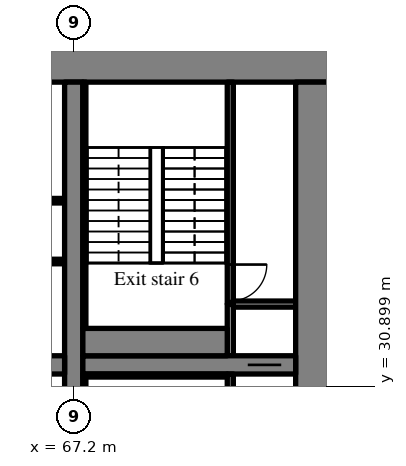
"""IFC4 building model, lengths in metres.
Left out: names, types, materials, properties, quantities, classifications, styles, units other than length and angle.
Written with IfcOpenShell. Run it as: python <this file> out.ifc"""

import sys

from ifc_helpers import new_model, si_unit, direction, frame, frame_2d, origin, place, context, subcontext, project, spatial, rectangle, extrude, source, transform, mapped, element, fill, save


model = new_model("IFC4")
c1 = context("Model", 3, precision=1e-05, world=origin(), true_north=direction((0.0, 1.0)))
c2 = subcontext(c1, "Body", "Model", "MODEL_VIEW")
j1 = project(units=[si_unit("LENGTHUNIT", "METRE"), si_unit("PLANEANGLEUNIT", "RADIAN")], contexts=[c1])
p1 = place(None, origin())
s1 = spatial("IfcSite", under=j1, at=p1, CompositionType="ELEMENT")
p2 = place(p1, origin())
s2 = spatial("IfcBuilding", under=s1, at=p2, CompositionType="ELEMENT")
p3 = place(p2, frame((0.0, 0.0, -4.5)))
s3 = spatial("IfcBuildingStorey", under=s2, at=p3, CompositionType="ELEMENT", Elevation=-4.5)
m1 = source(origin(), c2, "Body", "SweptSolid", [
    extrude(rectangle(XDim=50.4, YDim=1.1, at=frame_2d((25.2, 0.0))), origin(), (0.0, 0.0, 1.0), 4.22),
])
p4 = place(p3, frame((25.2, 41.45, 0.0), z_axis=(0.0, 0.0, 1.0), x_axis=(1.0, 0.0, 0.0)))
e1 = element("IfcWall", 1, at=p4, inside=s3, PredefinedType="SHEAR", context=c2, shape_type="MappedRepresentation", body=[
    mapped(m1, transform((0.0, 0.0, 0.0), scale=1.0)),
])
m2 = source(origin(), c2, "Body", "SweptSolid", [
    extrude(rectangle(XDim=17.8, YDim=1.1, at=frame_2d((8.9, 0.0))), origin(), (0.0, 0.0, 1.0), 4.22),
])
p5 = place(p3, frame((75.05, 23.1, 0.0), z_axis=(0.0, 0.0, 1.0), x_axis=(0.0, 1.0, 0.0)))
e2 = element("IfcWall", 2, at=p5, inside=s3, PredefinedType="SHEAR", context=c2, shape_type="MappedRepresentation", body=[
    mapped(m2, transform((0.0, 0.0, 0.0), scale=1.0)),
])
m3 = source(origin(), c2, "Body", "SweptSolid", [
    extrude(rectangle(XDim=17.8, YDim=0.6, at=frame_2d((8.9, 0.0))), origin(), (0.0, 0.0, 1.0), 4.22),
])
p6 = place(p3, frame((67.2, 23.1, 0.0), z_axis=(0.0, 0.0, 1.0), x_axis=(0.0, 1.0, 0.0)))
e3 = element("IfcWall", 3, at=p6, inside=s3, PredefinedType="SHEAR", context=c2, shape_type="MappedRepresentation", body=[
    mapped(m3, transform((0.0, 0.0, 0.0), scale=1.0)),
])
m4 = source(origin(), c2, "Body", "SweptSolid", [
    extrude(rectangle(XDim=16.2, YDim=0.6, at=frame_2d((8.1, 0.0))), origin(), (0.0, 0.0, 1.0), 4.22),
])
p7 = place(p3, frame((50.7, 31.6, 0.0), z_axis=(0.0, 0.0, 1.0), x_axis=(1.0, 0.0, 0.0)))
e4 = element("IfcWall", 4, at=p7, inside=s3, PredefinedType="SHEAR", context=c2, shape_type="MappedRepresentation", body=[
    mapped(m4, transform((0.0, 0.0, 0.0), scale=1.0)),
])
m5 = source(origin(), c2, "Body", "SweptSolid", [
    extrude(rectangle(XDim=1.0, YDim=2.1, at=frame_2d((0.5, 1.05))), frame((0.0, 0.31, 0.0), z_axis=(0.0, -1.0, 0.0), x_axis=(1.0, 0.0, 0.0)), (0.0, 0.0, 1.0), 0.62),
])
p8 = place(p7, frame((0.55, 0.0, 0.0)))
e5 = element("IfcOpeningElement", 5, at=p8, cuts=e4, PredefinedType="OPENING", context=c2, shape_type="MappedRepresentation", body=[
    mapped(m5, transform((0.0, 0.0, 0.0), scale=1.0)),
])
m6 = source(origin(), c2, "Body", "SweptSolid", [
    extrude(rectangle(XDim=7.0, YDim=0.6, at=frame_2d((3.5, 0.0))), origin(), (0.0, 0.0, 1.0), 4.22),
])
p9 = place(p3, frame((67.5, 31.6, 0.0), z_axis=(0.0, 0.0, 1.0), x_axis=(1.0, 0.0, 0.0)))
e6 = element("IfcWall", 6, at=p9, inside=s3, PredefinedType="SHEAR", context=c2, shape_type="MappedRepresentation", body=[
    mapped(m6, transform((0.0, 0.0, 0.0), scale=1.0)),
])
m7 = source(origin(), c2, "Body", "SweptSolid", [
    extrude(rectangle(XDim=1.1, YDim=2.1, at=frame_2d((0.55, 1.05))), frame((0.0, 0.31, 0.0), z_axis=(0.0, -1.0, 0.0), x_axis=(1.0, 0.0, 0.0)), (0.0, 0.0, 1.0), 0.62),
])
p10 = place(p9, frame((5.425, 0.0, 0.0)))
e7 = element("IfcOpeningElement", 7, at=p10, cuts=e6, PredefinedType="OPENING", context=c2, shape_type="MappedRepresentation", body=[
    mapped(m7, transform((0.0, 0.0, 0.0), scale=1.0)),
])
m8 = source(origin(), c2, "Body", "SweptSolid", [
    extrude(rectangle(XDim=14.1, YDim=0.15, at=frame_2d((7.05, 0.0))), origin(), (0.0, 0.0, 1.0), 4.22),
])
p11 = place(p3, frame((66.9, 35.0, 0.0), z_axis=(0.0, 0.0, 1.0), x_axis=(-1.0, 0.0, 0.0)))
e8 = element("IfcWall", 8, at=p11, inside=s3, PredefinedType="PARTITIONING", context=c2, shape_type="MappedRepresentation", body=[
    mapped(m8, transform((0.0, 0.0, 0.0), scale=1.0)),
])
m9 = source(origin(), c2, "Body", "SweptSolid", [
    extrude(rectangle(XDim=0.9, YDim=2.1, at=frame_2d((0.45, 1.05))), frame((0.0, 0.085, 0.0), z_axis=(0.0, -1.0, 0.0), x_axis=(1.0, 0.0, 0.0)), (0.0, 0.0, 1.0), 0.17),
])
p12 = place(p11, frame((0.952, 0.0, 0.0)))
e9 = element("IfcOpeningElement", 9, at=p12, cuts=e8, PredefinedType="OPENING", context=c2, shape_type="MappedRepresentation", body=[
    mapped(m9, transform((0.0, 0.0, 0.0), scale=1.0)),
])
p13 = place(p11, frame((5.861, 0.0, 0.0)))
e10 = element("IfcOpeningElement", 10, at=p13, cuts=e8, PredefinedType="OPENING", context=c2, shape_type="MappedRepresentation", body=[
    mapped(m9, transform((0.0, 0.0, 0.0), scale=1.0)),
])
p14 = place(p11, frame((11.471, 0.0, 0.0)))
e11 = element("IfcOpeningElement", 11, at=p14, cuts=e8, PredefinedType="OPENING", context=c2, shape_type="MappedRepresentation", body=[
    mapped(m9, transform((0.0, 0.0, 0.0), scale=1.0)),
])
m10 = source(origin(), c2, "Body", "SweptSolid", [
    extrude(rectangle(XDim=16.2, YDim=0.15, at=frame_2d((8.1, 0.0))), origin(), (0.0, 0.0, 1.0), 4.22),
])
p15 = place(p3, frame((66.9, 37.0, 0.0), z_axis=(0.0, 0.0, 1.0), x_axis=(-1.0, 0.0, 0.0)))
e12 = element("IfcWall", 12, at=p15, inside=s3, PredefinedType="PARTITIONING", context=c2, shape_type="MappedRepresentation", body=[
    mapped(m10, transform((0.0, 0.0, 0.0), scale=1.0)),
])
p16 = place(p15, frame((0.765, 0.0, 0.0)))
e13 = element("IfcOpeningElement", 13, at=p16, cuts=e12, PredefinedType="OPENING", context=c2, shape_type="MappedRepresentation", body=[
    mapped(m9, transform((0.0, 0.0, 0.0), scale=1.0)),
])
p17 = place(p15, frame((3.6, 0.0, 0.0)))
e14 = element("IfcOpeningElement", 14, at=p17, cuts=e12, PredefinedType="OPENING", context=c2, shape_type="MappedRepresentation", body=[
    mapped(m9, transform((0.0, 0.0, 0.0), scale=1.0)),
])
p18 = place(p15, frame((9.27, 0.0, 0.0)))
e15 = element("IfcOpeningElement", 15, at=p18, cuts=e12, PredefinedType="OPENING", context=c2, shape_type="MappedRepresentation", body=[
    mapped(m9, transform((0.0, 0.0, 0.0), scale=1.0)),
])
p19 = place(p15, frame((14.535, 0.0, 0.0)))
e16 = element("IfcOpeningElement", 16, at=p19, cuts=e12, PredefinedType="OPENING", context=c2, shape_type="MappedRepresentation", body=[
    mapped(m9, transform((0.0, 0.0, 0.0), scale=1.0)),
])
m11 = source(origin(), c2, "Body", "SweptSolid", [
    extrude(rectangle(XDim=8.2, YDim=0.2, at=frame_2d((4.1, 0.0))), origin(), (0.0, 0.0, 1.0), 4.22),
])
p20 = place(p3, frame((72.35, 23.1, 0.0), z_axis=(0.0, 0.0, 1.0), x_axis=(0.0, 1.0, 0.0)))
e17 = element("IfcWall", 17, at=p20, inside=s3, PredefinedType="SOLIDWALL", context=c2, shape_type="MappedRepresentation", body=[
    mapped(m11, transform((0.0, 0.0, 0.0), scale=1.0)),
])
m12 = source(origin(), c2, "Body", "SweptSolid", [
    extrude(rectangle(XDim=1.2, YDim=2.1, at=frame_2d((0.6, 1.05))), frame((0.0, 0.11, 0.0), z_axis=(0.0, -1.0, 0.0), x_axis=(1.0, 0.0, 0.0)), (0.0, 0.0, 1.0), 0.22),
])
p21 = place(p20, frame((0.5, 0.0, 0.0)))
e18 = element("IfcOpeningElement", 18, at=p21, cuts=e17, PredefinedType="OPENING", context=c2, shape_type="MappedRepresentation", body=[
    mapped(m12, transform((0.0, 0.0, 0.0), scale=1.0)),
])
m13 = source(origin(), c2, "Body", "SweptSolid", [
    extrude(rectangle(XDim=1.7, YDim=0.2, at=frame_2d((0.85, 0.0))), origin(), (0.0, 0.0, 1.0), 4.22),
])
p22 = place(p3, frame((72.35, 31.9, 0.0), z_axis=(0.0, 0.0, 1.0), x_axis=(0.0, 1.0, 0.0)))
e19 = element("IfcWall", 19, at=p22, inside=s3, PredefinedType="SOLIDWALL", context=c2, shape_type="MappedRepresentation", body=[
    mapped(m13, transform((0.0, 0.0, 0.0), scale=1.0)),
])
m14 = source(origin(), c2, "Body", "SweptSolid", [
    extrude(rectangle(XDim=2.05, YDim=0.2, at=frame_2d((1.025, 0.0))), origin(), (0.0, 0.0, 1.0), 4.22),
])
p23 = place(p3, frame((72.45, 33.6, 0.0), z_axis=(0.0, 0.0, 1.0), x_axis=(1.0, 0.0, 0.0)))
e20 = element("IfcWall", 20, at=p23, inside=s3, PredefinedType="SOLIDWALL", context=c2, shape_type="MappedRepresentation", body=[
    mapped(m14, transform((0.0, 0.0, 0.0), scale=1.0)),
])
m15 = source(origin(), c2, "Body", "SweptSolid", [
    extrude(rectangle(XDim=7.3, YDim=0.2, at=frame_2d((3.65, 0.0))), origin(), (0.0, 0.0, 1.0), 4.22),
])
p24 = place(p3, frame((72.35, 33.6, 0.0), z_axis=(0.0, 0.0, 1.0), x_axis=(0.0, 1.0, 0.0)))
e21 = element("IfcWall", 21, at=p24, inside=s3, PredefinedType="SOLIDWALL", context=c2, shape_type="MappedRepresentation", body=[
    mapped(m15, transform((0.0, 0.0, 0.0), scale=1.0)),
])
p25 = place(p24, frame((0.1, 0.0, 0.0)))
e22 = element("IfcOpeningElement", 22, at=p25, cuts=e21, PredefinedType="OPENING", context=c2, shape_type="MappedRepresentation", body=[
    mapped(m12, transform((0.0, 0.0, 0.0), scale=1.0)),
])
m16 = source(origin(), c2, "Body", "SweptSolid", [
    extrude(rectangle(XDim=4.75, YDim=0.1, at=frame_2d((2.375, 0.0))), origin(), (0.0, 0.0, 1.0), 4.22),
])
p26 = place(p3, frame((67.5, 31.25, 0.0), z_axis=(0.0, 0.0, 1.0), x_axis=(1.0, 0.0, 0.0)))
e23 = element("IfcWall", 23, at=p26, inside=s3, PredefinedType="SOLIDWALL", context=c2, shape_type="MappedRepresentation", body=[
    mapped(m16, transform((0.0, 0.0, 0.0), scale=1.0)),
])
m17 = source(origin(), c2, "Body", "SweptSolid", [
    extrude(rectangle(XDim=8.1, YDim=0.1, at=frame_2d((4.05, 0.0))), origin(), (0.0, 0.0, 1.0), 4.22),
])
p27 = place(p3, frame((67.55, 23.1, 0.0), z_axis=(0.0, 0.0, 1.0), x_axis=(0.0, 1.0, 0.0)))
e24 = element("IfcWall", 24, at=p27, inside=s3, PredefinedType="SOLIDWALL", context=c2, shape_type="MappedRepresentation", body=[
    mapped(m17, transform((0.0, 0.0, 0.0), scale=1.0)),
])
m18 = source(origin(), c2, "Body", "SweptSolid", [
    extrude(rectangle(XDim=4.75, YDim=0.9, at=frame_2d((2.375, 0.0))), origin(), (0.0, 0.0, 1.0), 4.22),
])
p28 = place(p3, frame((67.5, 32.35, 0.0), z_axis=(0.0, 0.0, 1.0), x_axis=(1.0, 0.0, 0.0)))
e25 = element("IfcWall", 25, at=p28, inside=s3, PredefinedType="SOLIDWALL", context=c2, shape_type="MappedRepresentation", body=[
    mapped(m18, transform((0.0, 0.0, 0.0), scale=1.0)),
])
p29 = place(p3, frame((67.55, 32.8, 0.0), z_axis=(0.0, 0.0, 1.0), x_axis=(0.0, 1.0, 0.0)))
e26 = element("IfcWall", 26, at=p29, inside=s3, PredefinedType="SOLIDWALL", context=c2, shape_type="MappedRepresentation", body=[
    mapped(m17, transform((0.0, 0.0, 0.0), scale=1.0)),
])
m19 = source(origin(), c2, "Body", "SweptSolid", [
    extrude(rectangle(XDim=1.1, YDim=2.1, at=frame_2d((0.55, 1.05))), frame((0.0, 0.025, 0.0), z_axis=(0.0, -1.0, 0.0), x_axis=(1.0, 0.0, 0.0)), (0.0, 0.0, 1.0), 0.05),
])
p30 = place(p10, origin())
e27 = element("IfcDoor", 27, at=p30, inside=s3, OperationType="SLIDING_TO_RIGHT", PredefinedType="DOOR", context=c2, shape_type="MappedRepresentation", body=[
    mapped(m19, transform((0.0, 0.0, 0.0), scale=1.0)),
])
fill(e7, e27)
m20 = source(origin(), c2, "Body", "SweptSolid", [
    extrude(rectangle(XDim=1.2, YDim=2.1, at=frame_2d((0.6, 1.05))), frame((0.0, 0.025, 0.0), z_axis=(0.0, -1.0, 0.0), x_axis=(1.0, 0.0, 0.0)), (0.0, 0.0, 1.0), 0.05),
])
p31 = place(p25, origin())
e28 = element("IfcDoor", 28, at=p31, inside=s3, OperationType="SINGLE_SWING_RIGHT", PredefinedType="DOOR", context=c2, shape_type="MappedRepresentation", body=[
    mapped(m20, transform((0.0, 0.0, 0.0), scale=1.0)),
])
fill(e22, e28)
save(model, sys.argv[1])
